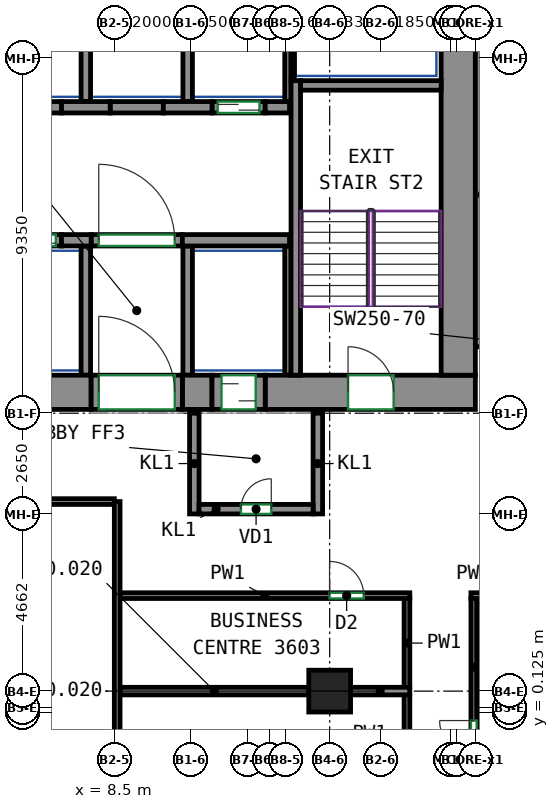
"""IFC4 building model, lengths in metres.
Left out: names, types, materials, properties, quantities, classifications, styles, units other than length and angle.
Written with IfcOpenShell. Run it as: python <this file> out.ifc"""

import sys

from ifc_helpers import new_model, si_unit, direction, frame, frame_2d, origin, origin_2d, place, context, subcontext, project, spatial, rectangle, extrude, source, transform, mapped, element, fill, save


model = new_model("IFC4")
c1 = context("Model", 3, precision=1e-05, world=origin(), true_north=direction((0.0, 1.0)))
c2 = subcontext(c1, "Body", "Model", "MODEL_VIEW")
j1 = project(units=[si_unit("LENGTHUNIT", "METRE"), si_unit("PLANEANGLEUNIT", "RADIAN")], contexts=[c1])
p1 = place(None, origin())
s1 = spatial("IfcSite", under=j1, at=p1, CompositionType="ELEMENT")
p2 = place(p1, origin())
s2 = spatial("IfcBuilding", under=s1, at=p2, CompositionType="ELEMENT")
p3 = place(p2, frame((0.0, 0.0, 157.5)))
s3 = spatial("IfcBuildingStorey", under=s2, at=p3, CompositionType="ELEMENT", Elevation=157.5)
m1 = source(origin(), c2, "Body", "SweptSolid", [
    extrude(rectangle(XDim=1.1, YDim=1.1, at=origin_2d()), origin(), (0.0, 0.0, 1.0), 3.12),
])
p4 = place(p3, frame((14.167, 0.688, 0.0), z_axis=(0.0, 0.0, 1.0), x_axis=(1.0, 0.0, 0.0)))
e1 = element("IfcColumn", 1, at=p4, inside=s3, PredefinedType="COLUMN", context=c2, shape_type="MappedRepresentation", body=[
    mapped(m1, transform((0.0, 0.0, 0.0))),
])
m2 = source(origin(), c2, "Body", "SweptSolid", [
    extrude(rectangle(XDim=14.18, YDim=0.9, at=frame_2d((7.09, 0.0))), origin(), (0.0, 0.0, 1.0), 3.12),
])
p5 = place(p3, frame((-6.29, 8.55, 0.0), z_axis=(0.0, 0.0, 1.0), x_axis=(1.0, 0.0, 0.0)))
e2 = element("IfcWall", 2, at=p5, inside=s3, PredefinedType="SHEAR", context=c2, shape_type="MappedRepresentation", body=[
    mapped(m2, transform((0.0, 0.0, 0.0))),
])
m3 = source(origin(), c2, "Body", "SweptSolid", [
    extrude(rectangle(XDim=0.78, YDim=0.9, at=frame_2d((0.39, 0.0))), origin(), (0.0, 0.0, 1.0), 3.12),
])
p6 = place(p3, frame((10.29, 8.55, 0.0), z_axis=(0.0, 0.0, 1.0), x_axis=(1.0, 0.0, 0.0)))
e3 = element("IfcWall", 3, at=p6, inside=s3, PredefinedType="SHEAR", context=c2, shape_type="MappedRepresentation", body=[
    mapped(m3, transform((0.0, 0.0, 0.0))),
])
m4 = source(origin(), c2, "Body", "SweptSolid", [
    extrude(rectangle(XDim=5.53, YDim=0.9, at=frame_2d((2.765, 0.0))), origin(), (0.0, 0.0, 1.0), 3.12),
])
p7 = place(p3, frame((12.47, 8.55, 0.0), z_axis=(0.0, 0.0, 1.0), x_axis=(1.0, 0.0, 0.0)))
e4 = element("IfcWall", 4, at=p7, inside=s3, PredefinedType="SHEAR", context=c2, shape_type="MappedRepresentation", body=[
    mapped(m4, transform((0.0, 0.0, 0.0))),
])
p8 = place(p7, frame((2.18, 0.0, 0.0)))
e5 = element("IfcOpeningElement", 5, at=p8, cuts=e4, PredefinedType="OPENING", context=c2, shape_type="SweptSolid", body=[
    extrude(rectangle(XDim=1.2, YDim=2.1, at=frame_2d((0.6, 1.05))), frame((0.0, 0.46, 0.0), z_axis=(0.0, -1.0, 0.0), x_axis=(1.0, 0.0, 0.0)), (0.0, 0.0, 1.0), 0.92),
])
m5 = source(origin(), c2, "Body", "SweptSolid", [
    extrude(rectangle(XDim=12.0, YDim=0.9, at=frame_2d((6.0, 0.0))), origin(), (0.0, 0.0, 1.0), 3.12),
])
p9 = place(p3, frame((17.55, 9.0, 0.0), z_axis=(0.0, 0.0, 1.0), x_axis=(0.0, 1.0, 0.0)))
e6 = element("IfcWall", 6, at=p9, inside=s3, PredefinedType="SHEAR", context=c2, shape_type="MappedRepresentation", body=[
    mapped(m5, transform((0.0, 0.0, 0.0))),
])
m6 = source(origin(), c2, "Body", "SweptSolid", [
    extrude(rectangle(XDim=7.75, YDim=0.25, at=frame_2d((3.875, 0.0))), origin(), (0.0, 0.0, 1.0), 3.12),
])
p10 = place(p3, frame((13.275, 9.0, 0.0), z_axis=(0.0, 0.0, 1.0), x_axis=(0.0, 1.0, 0.0)))
e7 = element("IfcWall", 7, at=p10, inside=s3, PredefinedType="SHEAR", context=c2, shape_type="MappedRepresentation", body=[
    mapped(m6, transform((0.0, 0.0, 0.0))),
])
m7 = source(origin(), c2, "Body", "SweptSolid", [
    extrude(rectangle(XDim=3.7, YDim=0.25, at=frame_2d((1.85, 0.0))), origin(), (0.0, 0.0, 1.0), 3.12),
])
p11 = place(p3, frame((13.4, 16.625, 0.0), z_axis=(0.0, 0.0, 1.0), x_axis=(1.0, 0.0, 0.0)))
e8 = element("IfcWall", 8, at=p11, inside=s3, PredefinedType="SHEAR", context=c2, shape_type="MappedRepresentation", body=[
    mapped(m7, transform((0.0, 0.0, 0.0))),
])
m8 = source(origin(), c2, "Body", "SweptSolid", [
    extrude(rectangle(XDim=8.0, YDim=0.35, at=frame_2d((4.0, 0.0))), origin(), (0.0, 0.0, 1.0), 3.12),
])
p12 = place(p3, frame((18.175, 9.75, 0.0), z_axis=(0.0, 0.0, 1.0), x_axis=(0.0, 1.0, 0.0)))
e9 = element("IfcWall", 9, at=p12, inside=s3, PredefinedType="SHEAR", context=c2, shape_type="MappedRepresentation", body=[
    mapped(m8, transform((0.0, 0.0, 0.0))),
])
m9 = source(origin(), c2, "Body", "SweptSolid", [
    extrude(rectangle(XDim=0.78, YDim=0.3, at=frame_2d((0.39, 0.0))), origin(), (0.0, 0.0, 1.0), 3.12),
])
p13 = place(p3, frame((7.11, 12.55, 0.0), z_axis=(0.0, 0.0, 1.0), x_axis=(1.0, 0.0, 0.0)))
e10 = element("IfcWall", 10, at=p13, inside=s3, PredefinedType="SHEAR", context=c2, shape_type="MappedRepresentation", body=[
    mapped(m9, transform((0.0, 0.0, 0.0))),
])
m10 = source(origin(), c2, "Body", "SweptSolid", [
    extrude(rectangle(XDim=2.82, YDim=0.3, at=frame_2d((1.41, 0.0))), origin(), (0.0, 0.0, 1.0), 3.12),
])
p14 = place(p3, frame((10.29, 12.55, 0.0), z_axis=(0.0, 0.0, 1.0), x_axis=(1.0, 0.0, 0.0)))
e11 = element("IfcWall", 11, at=p14, inside=s3, PredefinedType="SHEAR", context=c2, shape_type="MappedRepresentation", body=[
    mapped(m10, transform((0.0, 0.0, 0.0))),
])
m11 = source(origin(), c2, "Body", "SweptSolid", [
    extrude(rectangle(XDim=1.28, YDim=0.3, at=frame_2d((0.64, 0.0))), origin(), (0.0, 0.0, 1.0), 3.12),
])
p15 = place(p3, frame((7.11, 16.05, 0.0), z_axis=(0.0, 0.0, 1.0), x_axis=(1.0, 0.0, 0.0)))
e12 = element("IfcWall", 12, at=p15, inside=s3, PredefinedType="SHEAR", context=c2, shape_type="MappedRepresentation", body=[
    mapped(m11, transform((0.0, 0.0, 0.0))),
])
m12 = source(origin(), c2, "Body", "SweptSolid", [
    extrude(rectangle(XDim=1.28, YDim=0.3, at=frame_2d((0.64, 0.0))), origin(), (0.0, 0.0, 1.0), 3.12),
])
p16 = place(p3, frame((9.79, 16.05, 0.0), z_axis=(0.0, 0.0, 1.0), x_axis=(1.0, 0.0, 0.0)))
e13 = element("IfcWall", 13, at=p16, inside=s3, PredefinedType="SHEAR", context=c2, shape_type="MappedRepresentation", body=[
    mapped(m12, transform((0.0, 0.0, 0.0))),
])
m13 = source(origin(), c2, "Body", "SweptSolid", [
    extrude(rectangle(XDim=0.64, YDim=0.3, at=frame_2d((0.32, 0.0))), origin(), (0.0, 0.0, 1.0), 3.12),
])
p17 = place(p3, frame((12.47, 16.05, 0.0), z_axis=(0.0, 0.0, 1.0), x_axis=(1.0, 0.0, 0.0)))
e14 = element("IfcWall", 14, at=p17, inside=s3, PredefinedType="SHEAR", context=c2, shape_type="MappedRepresentation", body=[
    mapped(m13, transform((0.0, 0.0, 0.0))),
])
m14 = source(origin(), c2, "Body", "SweptSolid", [
    extrude(rectangle(XDim=1.4, YDim=0.3, at=frame_2d((0.7, 0.0))), origin(), (0.0, 0.0, 1.0), 3.12),
])
p18 = place(p3, frame((5.71, 12.55, 0.0), z_axis=(0.0, 0.0, 1.0), x_axis=(1.0, 0.0, 0.0)))
e15 = element("IfcWall", 15, at=p18, inside=s3, PredefinedType="PARTITIONING", context=c2, shape_type="MappedRepresentation", body=[
    mapped(m14, transform((0.0, 0.0, 0.0))),
])
p19 = place(p18, frame((0.15, 0.0, 0.0)))
e16 = element("IfcOpeningElement", 16, at=p19, cuts=e15, PredefinedType="OPENING", context=c2, shape_type="SweptSolid", body=[
    extrude(rectangle(XDim=1.1, YDim=2.1, at=frame_2d((0.55, 1.05))), frame((0.0, 0.16, 0.0), z_axis=(0.0, -1.0, 0.0), x_axis=(1.0, 0.0, 0.0)), (0.0, 0.0, 1.0), 0.32),
])
m15 = source(origin(), c2, "Body", "SweptSolid", [
    extrude(rectangle(XDim=1.4, YDim=0.3, at=frame_2d((0.7, 0.0))), origin(), (0.0, 0.0, 1.0), 3.12),
])
p20 = place(p3, frame((11.07, 16.05, 0.0), z_axis=(0.0, 0.0, 1.0), x_axis=(1.0, 0.0, 0.0)))
e17 = element("IfcWall", 17, at=p20, inside=s3, PredefinedType="PARTITIONING", context=c2, shape_type="MappedRepresentation", body=[
    mapped(m15, transform((0.0, 0.0, 0.0))),
])
p21 = place(p20, frame((0.15, 0.0, 0.0)))
e18 = element("IfcOpeningElement", 18, at=p21, cuts=e17, PredefinedType="OPENING", context=c2, shape_type="SweptSolid", body=[
    extrude(rectangle(XDim=1.1, YDim=2.1, at=frame_2d((0.55, 1.05))), frame((0.0, 0.16, 0.0), z_axis=(0.0, -1.0, 0.0), x_axis=(1.0, 0.0, 0.0)), (0.0, 0.0, 1.0), 0.32),
])
m16 = source(origin(), c2, "Body", "SweptSolid", [
    extrude(rectangle(XDim=2.4, YDim=0.3, at=frame_2d((1.2, 0.0))), origin(), (0.0, 0.0, 1.0), 3.12),
])
p22 = place(p3, frame((7.89, 12.55, 0.0), z_axis=(0.0, 0.0, 1.0), x_axis=(1.0, 0.0, 0.0)))
e19 = element("IfcWall", 19, at=p22, inside=s3, PredefinedType="PARTITIONING", context=c2, shape_type="MappedRepresentation", body=[
    mapped(m16, transform((0.0, 0.0, 0.0))),
])
p23 = place(p22, frame((0.2, 0.0, 0.0)))
e20 = element("IfcOpeningElement", 20, at=p23, cuts=e19, PredefinedType="OPENING", context=c2, shape_type="SweptSolid", body=[
    extrude(rectangle(XDim=2.0, YDim=2.1, at=frame_2d((1.0, 1.05))), frame((0.0, 0.16, 0.0), z_axis=(0.0, -1.0, 0.0), x_axis=(1.0, 0.0, 0.0)), (0.0, 0.0, 1.0), 0.32),
])
for number, where, z_axis, x_axis in (
    (21, (5.71, 16.05, 0.0), (0.0, 0.0, 1.0), (1.0, 0.0, 0.0)),
    (22, (8.39, 16.05, 0.0), (0.0, 0.0, 1.0), (1.0, 0.0, 0.0)),
):
    element("IfcWall", number, at=place(p3, frame(where, z_axis=z_axis, x_axis=x_axis)), inside=s3, PredefinedType="PARTITIONING", context=c2, shape_type="MappedRepresentation", body=[
        mapped(m14, transform((0.0, 0.0, 0.0))),
    ])
m17 = source(origin(), c2, "Body", "SweptSolid", [
    extrude(rectangle(XDim=2.65, YDim=0.25, at=frame_2d((1.325, 0.0))), origin(), (0.0, 0.0, 1.0), 3.12),
])
for number, where, z_axis, x_axis in (
    (23, (10.605, 5.35, 0.0), (0.0, 0.0, 1.0), (0.0, 1.0, 0.0)),
    (24, (13.855, 5.35, 0.0), (0.0, 0.0, 1.0), (0.0, 1.0, 0.0)),
):
    element("IfcWall", number, at=place(p3, frame(where, z_axis=z_axis, x_axis=x_axis)), inside=s3, PredefinedType="PARTITIONING", context=c2, shape_type="MappedRepresentation", body=[
        mapped(m17, transform((0.0, 0.0, 0.0))),
    ])
m18 = source(origin(), c2, "Body", "SweptSolid", [
    extrude(rectangle(XDim=3.0, YDim=0.25, at=frame_2d((1.5, 0.0))), origin(), (0.0, 0.0, 1.0), 3.12),
])
p24 = place(p3, frame((10.73, 5.475, 0.0), z_axis=(0.0, 0.0, 1.0), x_axis=(1.0, 0.0, 0.0)))
e25 = element("IfcWall", 25, at=p24, inside=s3, PredefinedType="PARTITIONING", context=c2, shape_type="MappedRepresentation", body=[
    mapped(m18, transform((0.0, 0.0, 0.0))),
])
p25 = place(p24, frame((1.1, 0.0, 0.0)))
e26 = element("IfcOpeningElement", 26, at=p25, cuts=e25, PredefinedType="OPENING", context=c2, shape_type="SweptSolid", body=[
    extrude(rectangle(XDim=0.8, YDim=2.0, at=frame_2d((0.4, 1.0))), frame((0.0, 0.135, 0.0), z_axis=(0.0, -1.0, 0.0), x_axis=(1.0, 0.0, 0.0)), (0.0, 0.0, 1.0), 0.27),
])
m19 = source(origin(), c2, "Body", "SweptSolid", [
    extrude(rectangle(XDim=3.275, YDim=0.165, at=frame_2d((1.638, 0.0))), origin(), (0.0, 0.0, 1.0), 3.12),
])
p26 = place(p3, frame((13.067, 16.2, 0.0), z_axis=(0.0, 0.0, 1.0), x_axis=(0.0, 1.0, 0.0)))
e27 = element("IfcWall", 27, at=p26, inside=s3, PredefinedType="PARTITIONING", context=c2, shape_type="MappedRepresentation", body=[
    mapped(m19, transform((0.0, 0.0, 0.0))),
])
m20 = source(origin(), c2, "Body", "SweptSolid", [
    extrude(rectangle(XDim=3.275, YDim=0.25, at=frame_2d((1.638, 0.0))), origin(), (0.0, 0.0, 1.0), 3.12),
])
p27 = place(p3, frame((10.43, 16.2, 0.0), z_axis=(0.0, 0.0, 1.0), x_axis=(0.0, 1.0, 0.0)))
e28 = element("IfcWall", 28, at=p27, inside=s3, PredefinedType="PARTITIONING", context=c2, shape_type="MappedRepresentation", body=[
    mapped(m20, transform((0.0, 0.0, 0.0))),
])
m21 = source(origin(), c2, "Body", "SweptSolid", [
    extrude(rectangle(XDim=2.725, YDim=0.085, at=frame_2d((1.363, 0.0))), origin(), (0.0, 0.0, 1.0), 3.12),
])
p28 = place(p3, frame((13.192, 16.75, 0.0), z_axis=(0.0, 0.0, 1.0), x_axis=(0.0, 1.0, 0.0)))
e29 = element("IfcWall", 29, at=p28, inside=s3, PredefinedType="PARTITIONING", context=c2, shape_type="MappedRepresentation", body=[
    mapped(m21, transform((0.0, 0.0, 0.0))),
])
p29 = place(p3, frame((7.75, 16.2, 0.0), z_axis=(0.0, 0.0, 1.0), x_axis=(0.0, 1.0, 0.0)))
e30 = element("IfcWall", 30, at=p29, inside=s3, PredefinedType="PARTITIONING", context=c2, shape_type="MappedRepresentation", body=[
    mapped(m20, transform((0.0, 0.0, 0.0))),
])
m22 = source(origin(), c2, "Body", "SweptSolid", [
    extrude(rectangle(XDim=3.4, YDim=0.25, at=frame_2d((1.7, 0.0))), origin(), (0.0, 0.0, 1.0), 3.12),
])
p30 = place(p3, frame((10.43, 9.0, 0.0), z_axis=(0.0, 0.0, 1.0), x_axis=(0.0, 1.0, 0.0)))
e31 = element("IfcWall", 31, at=p30, inside=s3, PredefinedType="PARTITIONING", context=c2, shape_type="MappedRepresentation", body=[
    mapped(m22, transform((0.0, 0.0, 0.0))),
])
m23 = source(origin(), c2, "Body", "SweptSolid", [
    extrude(rectangle(XDim=3.4, YDim=0.165, at=frame_2d((1.7, 0.0))), origin(), (0.0, 0.0, 1.0), 3.12),
])
p31 = place(p3, frame((13.067, 9.0, 0.0), z_axis=(0.0, 0.0, 1.0), x_axis=(0.0, 1.0, 0.0)))
e32 = element("IfcWall", 32, at=p31, inside=s3, PredefinedType="PARTITIONING", context=c2, shape_type="MappedRepresentation", body=[
    mapped(m23, transform((0.0, 0.0, 0.0))),
])
p32 = place(p3, frame((7.75, 9.0, 0.0), z_axis=(0.0, 0.0, 1.0), x_axis=(0.0, 1.0, 0.0)))
e33 = element("IfcWall", 33, at=p32, inside=s3, PredefinedType="PARTITIONING", context=c2, shape_type="MappedRepresentation", body=[
    mapped(m22, transform((0.0, 0.0, 0.0))),
])
m24 = source(origin(), c2, "Body", "SweptSolid", [
    extrude(rectangle(XDim=2.4, YDim=0.9, at=frame_2d((1.2, 0.0))), origin(), (0.0, 0.0, 1.0), 2.7),
])
p33 = place(p3, frame((7.89, 8.55, 0.0), z_axis=(0.0, 0.0, 1.0), x_axis=(1.0, 0.0, 0.0)))
e34 = element("IfcWall", 34, at=p33, inside=s3, PredefinedType="PARTITIONING", context=c2, shape_type="MappedRepresentation", body=[
    mapped(m24, transform((0.0, 0.0, 0.0))),
])
p34 = place(p33, frame((0.2, 0.0, 0.0)))
e35 = element("IfcOpeningElement", 35, at=p34, cuts=e34, PredefinedType="OPENING", context=c2, shape_type="SweptSolid", body=[
    extrude(rectangle(XDim=2.0, YDim=2.1, at=frame_2d((1.0, 1.05))), frame((0.0, 0.46, 0.0), z_axis=(0.0, -1.0, 0.0), x_axis=(1.0, 0.0, 0.0)), (0.0, 0.0, 1.0), 0.92),
])
m25 = source(origin(), c2, "Body", "SweptSolid", [
    extrude(rectangle(XDim=1.4, YDim=0.9, at=frame_2d((0.7, 0.0))), origin(), (0.0, 0.0, 1.0), 2.7),
])
p35 = place(p3, frame((11.07, 8.55, 0.0), z_axis=(0.0, 0.0, 1.0), x_axis=(1.0, 0.0, 0.0)))
e36 = element("IfcWall", 36, at=p35, inside=s3, PredefinedType="PARTITIONING", context=c2, shape_type="MappedRepresentation", body=[
    mapped(m25, transform((0.0, 0.0, 0.0))),
])
p36 = place(p35, frame((0.25, 0.0, 0.0)))
e37 = element("IfcOpeningElement", 37, at=p36, cuts=e36, PredefinedType="OPENING", context=c2, shape_type="SweptSolid", body=[
    extrude(rectangle(XDim=0.9, YDim=2.1, at=frame_2d((0.45, 1.05))), frame((0.0, 0.46, 0.0), z_axis=(0.0, -1.0, 0.0), x_axis=(1.0, 0.0, 0.0)), (0.0, 0.0, 1.0), 0.92),
])
p37 = place(p3, frame((17.884, 3.2, 0.0), z_axis=(0.0, 0.0, 1.0), x_axis=(1.0, 0.0, 0.0)))
e38 = element("IfcWall", 38, at=p37, inside=s3, PredefinedType="PARTITIONING", context=c2, shape_type="SweptSolid", body=[
    extrude(rectangle(XDim=2.091, YDim=0.15, at=frame_2d((1.045, 0.0))), origin(), (0.0, 0.0, 1.0), 3.12),
])
p38 = place(p3, frame((17.959, -2.894, 0.0), z_axis=(0.0, 0.0, 1.0), x_axis=(0.0, 1.0, 0.0)))
e39 = element("IfcWall", 39, at=p38, inside=s3, PredefinedType="PARTITIONING", context=c2, shape_type="SweptSolid", body=[
    extrude(rectangle(XDim=6.019, YDim=0.15, at=frame_2d((3.01, 0.0))), origin(), (0.0, 0.0, 1.0), 3.12),
])
p39 = place(p38, frame((1.907, 0.0, 0.0)))
e40 = element("IfcOpeningElement", 40, at=p39, cuts=e39, PredefinedType="OPENING", context=c2, shape_type="SweptSolid", body=[
    extrude(rectangle(XDim=0.9, YDim=2.1, at=frame_2d((0.45, 1.05))), frame((0.0, 0.085, 0.0), z_axis=(0.0, -1.0, 0.0), x_axis=(1.0, 0.0, 0.0)), (0.0, 0.0, 1.0), 0.17),
])
p40 = place(p3, frame((16.2, -2.879, 0.0), z_axis=(0.0, 0.0, 1.0), x_axis=(0.0, 1.0, 0.0)))
e41 = element("IfcWall", 41, at=p40, inside=s3, PredefinedType="PARTITIONING", context=c2, shape_type="SweptSolid", body=[
    extrude(rectangle(XDim=3.477, YDim=0.15, at=frame_2d((1.738, 0.0))), origin(), (0.0, 0.0, 1.0), 3.12),
])
p41 = place(p40, frame((0.718, 0.0, 0.0)))
e42 = element("IfcOpeningElement", 42, at=p41, cuts=e41, PredefinedType="OPENING", context=c2, shape_type="SweptSolid", body=[
    extrude(rectangle(XDim=0.9, YDim=2.1, at=frame_2d((0.45, 1.05))), frame((0.0, 0.085, 0.0), z_axis=(0.0, -1.0, 0.0), x_axis=(1.0, 0.0, 0.0)), (0.0, 0.0, 1.0), 0.17),
])
p42 = place(p3, frame((16.2, 0.778, 0.0), z_axis=(0.0, 0.0, 1.0), x_axis=(0.0, 1.0, 0.0)))
e43 = element("IfcWall", 43, at=p42, inside=s3, PredefinedType="PARTITIONING", context=c2, shape_type="SweptSolid", body=[
    extrude(rectangle(XDim=2.347, YDim=0.15, at=frame_2d((1.173, 0.0))), origin(), (0.0, 0.0, 1.0), 3.12),
])
p43 = place(p3, frame((8.65, 3.2, 0.0), z_axis=(0.0, 0.0, 1.0), x_axis=(1.0, 0.0, 0.0)))
e44 = element("IfcWall", 44, at=p43, inside=s3, PredefinedType="PARTITIONING", context=c2, shape_type="SweptSolid", body=[
    extrude(rectangle(XDim=7.625, YDim=0.15, at=frame_2d((3.812, 0.0))), origin(), (0.0, 0.0, 1.0), 3.12),
])
p44 = place(p43, frame((5.513, 0.0, 0.0)))
e45 = element("IfcOpeningElement", 45, at=p44, cuts=e44, PredefinedType="OPENING", context=c2, shape_type="SweptSolid", body=[
    extrude(rectangle(XDim=0.9, YDim=2.1, at=frame_2d((0.45, 1.05))), frame((0.0, 0.085, 0.0), z_axis=(0.0, -1.0, 0.0), x_axis=(1.0, 0.0, 0.0)), (0.0, 0.0, 1.0), 0.17),
])
p45 = place(p3, frame((14.717, 0.688, 0.0), z_axis=(0.0, 0.0, 1.0), x_axis=(1.0, 0.0, 0.0)))
e46 = element("IfcWall", 46, at=p45, inside=s3, PredefinedType="PARTITIONING", context=c2, shape_type="SweptSolid", body=[
    extrude(rectangle(XDim=1.556, YDim=0.2, at=frame_2d((0.778, 0.0))), origin(), (0.0, 0.0, 1.0), 2.52),
])
p46 = place(p3, frame((8.65, 0.688, 0.0), z_axis=(0.0, 0.0, 1.0), x_axis=(1.0, 0.0, 0.0)))
e47 = element("IfcWall", 47, at=p46, inside=s3, PredefinedType="PARTITIONING", context=c2, shape_type="SweptSolid", body=[
    extrude(rectangle(XDim=4.967, YDim=0.2, at=frame_2d((2.483, 0.0))), origin(), (0.0, 0.0, 1.0), 2.52),
])
p47 = place(p3, frame((-6.575, 5.675, 0.0), z_axis=(0.0, 0.0, 1.0), x_axis=(1.0, 0.0, 0.0)))
e48 = element("IfcWall", 48, at=p47, inside=s3, PredefinedType="PARTITIONING", context=c2, shape_type="SweptSolid", body=[
    extrude(rectangle(XDim=15.075, YDim=0.15, at=frame_2d((7.538, 0.0))), origin(), (0.0, 0.0, 1.0), 3.12),
])
p48 = place(p3, frame((8.575, 5.675, 0.0), z_axis=(0.0, 0.0, 1.0), x_axis=(0.0, -1.0, 0.0)))
e49 = element("IfcWall", 49, at=p48, inside=s3, PredefinedType="PARTITIONING", context=c2, shape_type="SweptSolid", body=[
    extrude(rectangle(XDim=15.15, YDim=0.15, at=frame_2d((7.575, 0.0))), origin(), (0.0, 0.0, 1.0), 3.12),
])
p49 = place(p23, origin())
e50 = element("IfcDoor", 50, at=p49, inside=s3, OperationType="DOUBLE_DOOR_SINGLE_SWING", PredefinedType="DOOR", context=c2, shape_type="SweptSolid", body=[
    extrude(rectangle(XDim=2.0, YDim=2.1, at=frame_2d((1.0, 1.05))), frame((0.0, 0.025, 0.0), z_axis=(0.0, -1.0, 0.0), x_axis=(1.0, 0.0, 0.0)), (0.0, 0.0, 1.0), 0.05),
])
fill(e20, e50)
p50 = place(p34, origin())
e51 = element("IfcDoor", 51, at=p50, inside=s3, OperationType="DOUBLE_DOOR_SINGLE_SWING", PredefinedType="DOOR", context=c2, shape_type="SweptSolid", body=[
    extrude(rectangle(XDim=2.0, YDim=2.1, at=frame_2d((1.0, 1.05))), frame((0.0, 0.355, 0.0), z_axis=(0.0, -1.0, 0.0), x_axis=(1.0, 0.0, 0.0)), (0.0, 0.0, 1.0), 0.05),
])
fill(e35, e51)
p51 = place(p25, origin())
e52 = element("IfcDoor", 52, at=p51, inside=s3, OperationType="SINGLE_SWING_RIGHT", PredefinedType="DOOR", context=c2, shape_type="SweptSolid", body=[
    extrude(rectangle(XDim=0.8, YDim=2.0, at=frame_2d((0.4, 1.0))), frame((0.0, 0.025, 0.0), z_axis=(0.0, -1.0, 0.0), x_axis=(1.0, 0.0, 0.0)), (0.0, 0.0, 1.0), 0.05),
])
fill(e26, e52)
p52 = place(p36, origin())
e53 = element("IfcDoor", 53, at=p52, inside=s3, OperationType="SLIDING_TO_LEFT", PredefinedType="DOOR", context=c2, shape_type="SweptSolid", body=[
    extrude(rectangle(XDim=0.9, YDim=2.1, at=frame_2d((0.45, 1.05))), frame((0.0, 0.355, 0.0), z_axis=(0.0, -1.0, 0.0), x_axis=(1.0, 0.0, 0.0)), (0.0, 0.0, 1.0), 0.05),
])
fill(e37, e53)
p53 = place(p19, origin())
e54 = element("IfcDoor", 54, at=p53, inside=s3, OperationType="DOUBLE_DOOR_SLIDING", PredefinedType="DOOR", context=c2, shape_type="SweptSolid", body=[
    extrude(rectangle(XDim=1.1, YDim=2.1, at=frame_2d((0.55, 1.05))), frame((0.0, 0.025, 0.0), z_axis=(0.0, -1.0, 0.0), x_axis=(1.0, 0.0, 0.0)), (0.0, 0.0, 1.0), 0.05),
])
fill(e16, e54)
p54 = place(p21, origin())
e55 = element("IfcDoor", 55, at=p54, inside=s3, OperationType="DOUBLE_DOOR_SLIDING", PredefinedType="DOOR", context=c2, shape_type="SweptSolid", body=[
    extrude(rectangle(XDim=1.1, YDim=2.1, at=frame_2d((0.55, 1.05))), frame((0.0, 0.025, 0.0), z_axis=(0.0, -1.0, 0.0), x_axis=(1.0, 0.0, 0.0)), (0.0, 0.0, 1.0), 0.05),
])
fill(e18, e55)
p55 = place(p8, origin())
e56 = element("IfcDoor", 56, at=p55, inside=s3, OperationType="DOUBLE_DOOR_SINGLE_SWING", PredefinedType="DOOR", context=c2, shape_type="SweptSolid", body=[
    extrude(rectangle(XDim=1.2, YDim=2.1, at=frame_2d((0.6, 1.05))), frame((0.0, 0.355, 0.0), z_axis=(0.0, -1.0, 0.0), x_axis=(1.0, 0.0, 0.0)), (0.0, 0.0, 1.0), 0.05),
])
fill(e5, e56)
p56 = place(p39, origin())
e57 = element("IfcDoor", 57, at=p56, inside=s3, OperationType="SINGLE_SWING_RIGHT", PredefinedType="DOOR", context=c2, shape_type="SweptSolid", body=[
    extrude(rectangle(XDim=0.9, YDim=2.1, at=frame_2d((0.45, 1.05))), frame((0.0, 0.025, 0.0), z_axis=(0.0, -1.0, 0.0), x_axis=(1.0, 0.0, 0.0)), (0.0, 0.0, 1.0), 0.05),
])
fill(e40, e57)
p57 = place(p44, origin())
e58 = element("IfcDoor", 58, at=p57, inside=s3, OperationType="SINGLE_SWING_LEFT", PredefinedType="DOOR", context=c2, shape_type="SweptSolid", body=[
    extrude(rectangle(XDim=0.9, YDim=2.1, at=frame_2d((0.45, 1.05))), frame((0.0, 0.025, 0.0), z_axis=(0.0, -1.0, 0.0), x_axis=(1.0, 0.0, 0.0)), (0.0, 0.0, 1.0), 0.05),
])
fill(e45, e58)
save(model, sys.argv[1])
